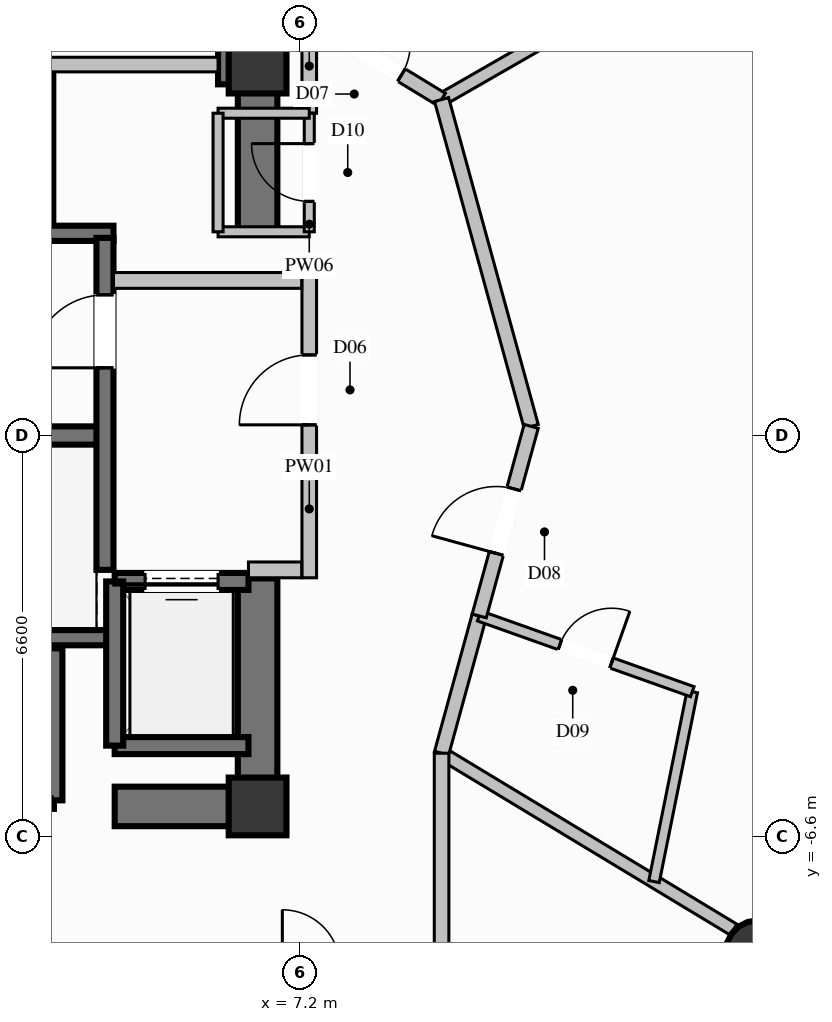
"""IFC4 building model, lengths in metres.
Left out: names, types, materials, properties, quantities, classifications, styles, units other than length and angle.
Written with IfcOpenShell. Run it as: python <this file> out.ifc"""

import sys

from ifc_helpers import new_model, si_unit, direction, frame, frame_2d, origin, origin_2d, place, context, subcontext, project, spatial, rectangle, circle, extrude, element, fill, save


model = new_model("IFC4")
c1 = context("Model", 3, precision=1e-05, world=origin(), true_north=direction((0.0, 1.0)))
c2 = subcontext(c1, "Body", "Model", "MODEL_VIEW")
j1 = project(units=[si_unit("LENGTHUNIT", "METRE"), si_unit("PLANEANGLEUNIT", "RADIAN")], contexts=[c1])
p1 = place(None, origin())
s1 = spatial("IfcSite", under=j1, at=p1, CompositionType="ELEMENT")
p2 = place(p1, origin())
s2 = spatial("IfcBuilding", under=s1, at=p2, CompositionType="ELEMENT")
p3 = place(p2, frame((0.0, 0.0, 117.0)))
s3 = spatial("IfcBuildingStorey", under=s2, at=p3, CompositionType="ELEMENT", Elevation=117.0)
for number, where, z_axis, x_axis in (
    (1, (6.5, -6.1, 0.0), (0.0, 0.0, 1.0), (1.0, 0.0, 0.0)),
    (2, (6.5, 6.1, 0.0), (0.0, 0.0, 1.0), (1.0, 0.0, 0.0)),
):
    element("IfcColumn", number, at=place(p3, frame(where, z_axis=z_axis, x_axis=x_axis)), inside=s3, PredefinedType="COLUMN", context=c2, shape_type="SweptSolid", body=[
        extrude(rectangle(XDim=0.95, YDim=0.95, at=origin_2d()), origin(), (0.0, 0.0, 1.0), 3.6),
    ])
p4 = place(p3, frame((-3.99, 0.0, 0.0), z_axis=(0.0, 0.0, 1.0), x_axis=(1.0, 0.0, 0.0)))
e3 = element("IfcWall", 3, at=p4, inside=s3, PredefinedType="SHEAR", context=c2, shape_type="SweptSolid", body=[
    extrude(rectangle(XDim=7.98, YDim=0.3, at=frame_2d((3.99, 0.0))), origin(), (0.0, 0.0, 1.0), 3.6),
])
for number, where, z_axis, x_axis in (
    (4, (-4.13, -3.325, 0.0), (0.0, 0.0, 1.0), (1.0, 0.0, 0.0)),
    (5, (-4.13, 3.325, 0.0), (0.0, 0.0, 1.0), (1.0, 0.0, 0.0)),
):
    element("IfcWall", number, at=place(p3, frame(where, z_axis=z_axis, x_axis=x_axis)), inside=s3, PredefinedType="SOLIDWALL", context=c2, shape_type="SweptSolid", body=[
        extrude(rectangle(XDim=8.26, YDim=0.25, at=frame_2d((4.13, 0.0))), origin(), (0.0, 0.0, 1.0), 3.6),
    ])
p5 = place(p3, frame((4.15, -6.1, 0.0), z_axis=(0.0, 0.0, 1.0), x_axis=(1.0, 0.0, 0.0)))
e6 = element("IfcWall", 6, at=p5, inside=s3, PredefinedType="SHEAR", context=c2, shape_type="SweptSolid", body=[
    extrude(rectangle(XDim=2.025, YDim=0.65, at=frame_2d((1.013, 0.0))), origin(), (0.0, 0.0, 1.0), 3.6),
])
p6 = place(p3, frame((5.85, 6.1, 0.0), z_axis=(0.0, 0.0, 1.0), x_axis=(1.0, 0.0, 0.0)))
e7 = element("IfcWall", 7, at=p6, inside=s3, PredefinedType="SHEAR", context=c2, shape_type="SweptSolid", body=[
    extrude(rectangle(XDim=0.325, YDim=0.65, at=frame_2d((0.163, 0.0))), origin(), (0.0, 0.0, 1.0), 3.6),
])
p7 = place(p3, frame((6.5, -6.425, 0.0), z_axis=(0.0, 0.0, 1.0), x_axis=(0.0, 1.0, 0.0)))
e8 = element("IfcWall", 8, at=p7, inside=s3, PredefinedType="SHEAR", context=c2, shape_type="SweptSolid", body=[
    extrude(rectangle(XDim=4.075, YDim=0.65, at=frame_2d((2.038, 0.0))), origin(), (0.0, 0.0, 1.0), 3.6),
])
p8 = place(p3, frame((6.5, 3.35, 0.0), z_axis=(0.0, 0.0, 1.0), x_axis=(0.0, 1.0, 0.0)))
e9 = element("IfcWall", 9, at=p8, inside=s3, PredefinedType="SHEAR", context=c2, shape_type="SweptSolid", body=[
    extrude(rectangle(XDim=3.075, YDim=0.65, at=frame_2d((1.538, 0.0))), origin(), (0.0, 0.0, 1.0), 3.6),
])
p9 = place(p3, frame((14.722, -8.5, 0.0), z_axis=(0.0, 0.0, 1.0), x_axis=(1.0, 0.0, 0.0)))
e10 = element("IfcColumn", 10, at=p9, inside=s3, PredefinedType="COLUMN", context=c2, shape_type="SweptSolid", body=[
    extrude(circle(Radius=0.525, at=origin_2d()), origin(), (0.0, 0.0, 1.0), 3.6),
])
p10 = place(p3, frame((1.05, -6.0, 0.0), z_axis=(0.0, 0.0, 1.0), x_axis=(1.0, 0.0, 0.0)))
e11 = element("IfcWall", 11, at=p10, inside=s3, PredefinedType="SOLIDWALL", context=c2, shape_type="SweptSolid", body=[
    extrude(rectangle(XDim=2.1, YDim=0.28, at=frame_2d((1.05, 0.0))), origin(), (0.0, 0.0, 1.0), 3.35),
])
p11 = place(p10, frame((0.5, 0.0, 0.0)))
e12 = element("IfcOpeningElement", 12, at=p11, cuts=e11, PredefinedType="OPENING", context=c2, shape_type="SweptSolid", body=[
    extrude(rectangle(XDim=1.1, YDim=2.2, at=frame_2d((0.55, 1.1))), frame((0.0, 0.15, 0.0), z_axis=(0.0, -1.0, 0.0), x_axis=(1.0, 0.0, 0.0)), (0.0, 0.0, 1.0), 0.3),
])
for number, where, z_axis, x_axis in (
    (13, (3.15, -6.0, 0.0), (0.0, 0.0, 1.0), (0.0, 1.0, 0.0)),
    (14, (3.0, 3.5, 0.0), (0.0, 0.0, 1.0), (0.0, 1.0, 0.0)),
):
    element("IfcWall", number, at=place(p3, frame(where, z_axis=z_axis, x_axis=x_axis)), inside=s3, PredefinedType="SOLIDWALL", context=c2, shape_type="SweptSolid", body=[
        extrude(rectangle(XDim=2.5, YDim=0.28, at=frame_2d((1.25, 0.0))), origin(), (0.0, 0.0, 1.0), 3.35),
    ])
p12 = place(p3, frame((4.15, -5.1, 0.0), z_axis=(0.0, 0.0, 1.0), x_axis=(1.0, 0.0, 0.0)))
e15 = element("IfcWall", 15, at=p12, inside=s3, PredefinedType="SOLIDWALL", context=c2, shape_type="SweptSolid", body=[
    extrude(rectangle(XDim=2.2, YDim=0.28, at=frame_2d((1.1, 0.0))), origin(), (0.0, 0.0, 1.0), 3.35),
])
p13 = place(p3, frame((6.35, -2.4, 0.0), z_axis=(0.0, 0.0, 1.0), x_axis=(-1.0, 0.0, 0.0)))
e16 = element("IfcWall", 16, at=p13, inside=s3, PredefinedType="SOLIDWALL", context=c2, shape_type="SweptSolid", body=[
    extrude(rectangle(XDim=2.2, YDim=0.28, at=frame_2d((1.1, 0.0))), origin(), (0.0, 0.0, 1.0), 3.35),
])
p14 = place(p13, frame((0.5, 0.0, 0.0)))
e17 = element("IfcOpeningElement", 17, at=p14, cuts=e16, PredefinedType="OPENING", context=c2, shape_type="SweptSolid", body=[
    extrude(rectangle(XDim=1.2, YDim=2.2, at=frame_2d((0.6, 1.1))), frame((0.0, 0.15, 0.0), z_axis=(0.0, -1.0, 0.0), x_axis=(1.0, 0.0, 0.0)), (0.0, 0.0, 1.0), 0.3),
])
p15 = place(p3, frame((4.15, -2.4, 0.0), z_axis=(0.0, 0.0, 1.0), x_axis=(0.0, -1.0, 0.0)))
e18 = element("IfcWall", 18, at=p15, inside=s3, PredefinedType="SOLIDWALL", context=c2, shape_type="SweptSolid", body=[
    extrude(rectangle(XDim=2.7, YDim=0.28, at=frame_2d((1.35, 0.0))), origin(), (0.0, 0.0, 1.0), 3.35),
])
p16 = place(p3, frame((3.99, -2.21, 0.0), z_axis=(0.0, 0.0, 1.0), x_axis=(0.0, 1.0, 0.0)))
e19 = element("IfcWall", 19, at=p16, inside=s3, PredefinedType="SOLIDWALL", context=c2, shape_type="SweptSolid", body=[
    extrude(rectangle(XDim=5.46, YDim=0.28, at=frame_2d((2.73, 0.0))), origin(), (0.0, 0.0, 1.0), 3.35),
])
p17 = place(p16, frame((3.323, 0.0, 0.0)))
e20 = element("IfcOpeningElement", 20, at=p17, cuts=e19, PredefinedType="OPENING", context=c2, shape_type="SweptSolid", body=[
    extrude(rectangle(XDim=1.2, YDim=2.2, at=frame_2d((0.6, 1.1))), frame((0.0, 0.15, 0.0), z_axis=(0.0, -1.0, 0.0), x_axis=(1.0, 0.0, 0.0)), (0.0, 0.0, 1.0), 0.3),
])
p18 = place(p3, frame((7.35, -2.34, 0.0), z_axis=(0.0, 0.0, 1.0), x_axis=(0.0, 1.0, 0.0)))
e21 = element("IfcWall", 21, at=p18, inside=s3, PredefinedType="PARTITIONING", context=c2, shape_type="SweptSolid", body=[
    extrude(rectangle(XDim=5.02, YDim=0.24, at=frame_2d((2.51, 0.0))), origin(), (0.0, 0.0, 1.0), 2.435),
])
p19 = place(p18, frame((2.515, 0.0, 0.0)))
e22 = element("IfcOpeningElement", 22, at=p19, cuts=e21, PredefinedType="OPENING", context=c2, shape_type="SweptSolid", body=[
    extrude(rectangle(XDim=1.15, YDim=2.2, at=frame_2d((0.575, 1.1))), frame((0.0, 0.13, 0.0), z_axis=(0.0, -1.0, 0.0), x_axis=(1.0, 0.0, 0.0)), (0.0, 0.0, 1.0), 0.26),
])
p20 = place(p3, frame((6.35, -2.21, 0.0), z_axis=(0.0, 0.0, 1.0), x_axis=(1.0, 0.0, 0.0)))
e23 = element("IfcWall", 23, at=p20, inside=s3, PredefinedType="PARTITIONING", context=c2, shape_type="SweptSolid", body=[
    extrude(rectangle(XDim=0.875, YDim=0.26, at=frame_2d((0.438, 0.0))), origin(), (0.0, 0.0, 1.0), 3.35),
])
p21 = place(p3, frame((4.13, 2.55, 0.0), z_axis=(0.0, 0.0, 1.0), x_axis=(1.0, 0.0, 0.0)))
e24 = element("IfcWall", 24, at=p21, inside=s3, PredefinedType="PARTITIONING", context=c2, shape_type="SweptSolid", body=[
    extrude(rectangle(XDim=3.095, YDim=0.26, at=frame_2d((1.548, 0.0))), origin(), (0.0, 0.0, 1.0), 3.35),
])
p22 = place(p3, frame((7.35, 5.3, 0.0), z_axis=(0.0, 0.0, 1.0), x_axis=(0.0, 1.0, 0.0)))
e25 = element("IfcWall", 25, at=p22, inside=s3, PredefinedType="PARTITIONING", context=c2, shape_type="SweptSolid", body=[
    extrude(rectangle(XDim=1.55, YDim=0.24, at=frame_2d((0.775, 0.0))), origin(), (0.0, 0.0, 1.0), 2.435),
])
p23 = place(p3, frame((3.0, 6.1, 0.0), z_axis=(0.0, 0.0, 1.0), x_axis=(1.0, 0.0, 0.0)))
e26 = element("IfcWall", 26, at=p23, inside=s3, PredefinedType="PARTITIONING", context=c2, shape_type="SweptSolid", body=[
    extrude(rectangle(XDim=2.85, YDim=0.24, at=frame_2d((1.425, 0.0))), origin(), (0.0, 0.0, 1.0), 2.435),
])
p24 = place(p3, frame((5.85, 3.35, 0.0), z_axis=(0.0, 0.0, 1.0), x_axis=(1.0, 0.0, 0.0)))
e27 = element("IfcWall", 27, at=p24, inside=s3, PredefinedType="PARTITIONING", context=c2, shape_type="SweptSolid", body=[
    extrude(rectangle(XDim=1.5, YDim=0.165, at=frame_2d((0.75, 0.0))), origin(), (0.0, 0.0, 1.0), 3.35),
])
p25 = place(p3, frame((7.35, 3.35, 0.0), z_axis=(0.0, 0.0, 1.0), x_axis=(0.0, 1.0, 0.0)))
e28 = element("IfcWall", 28, at=p25, inside=s3, PredefinedType="PARTITIONING", context=c2, shape_type="SweptSolid", body=[
    extrude(rectangle(XDim=1.95, YDim=0.165, at=frame_2d((0.975, 0.0))), origin(), (0.0, 0.0, 1.0), 3.35),
])
p26 = place(p25, frame((0.5, 0.0, 0.0)))
e29 = element("IfcOpeningElement", 29, at=p26, cuts=e28, PredefinedType="OPENING", context=c2, shape_type="SweptSolid", body=[
    extrude(rectangle(XDim=0.95, YDim=2.1, at=frame_2d((0.475, 1.05))), frame((0.0, 0.093, 0.0), z_axis=(0.0, -1.0, 0.0), x_axis=(1.0, 0.0, 0.0)), (0.0, 0.0, 1.0), 0.185),
])
p27 = place(p3, frame((7.35, 5.3, 0.0), z_axis=(0.0, 0.0, 1.0), x_axis=(-1.0, 0.0, 0.0)))
e30 = element("IfcWall", 30, at=p27, inside=s3, PredefinedType="PARTITIONING", context=c2, shape_type="SweptSolid", body=[
    extrude(rectangle(XDim=1.5, YDim=0.165, at=frame_2d((0.75, 0.0))), origin(), (0.0, 0.0, 1.0), 2.435),
])
p28 = place(p3, frame((5.85, 5.3, 0.0), z_axis=(0.0, 0.0, 1.0), x_axis=(0.0, -1.0, 0.0)))
e31 = element("IfcWall", 31, at=p28, inside=s3, PredefinedType="PARTITIONING", context=c2, shape_type="SweptSolid", body=[
    extrude(rectangle(XDim=1.95, YDim=0.165, at=frame_2d((0.975, 0.0))), origin(), (0.0, 0.0, 1.0), 2.435),
])
p29 = place(p3, frame((9.526, 5.525, 0.0), z_axis=(0.0, 0.0, 1.0), x_axis=(0.867217229482, 0.497929991956, 0.0)))
e32 = element("IfcWall", 32, at=p29, inside=s3, PredefinedType="PARTITIONING", context=c2, shape_type="SweptSolid", body=[
    extrude(rectangle(XDim=5.443, YDim=0.21, at=frame_2d((2.721, 0.0))), origin(), (0.0, 0.0, 1.0), 2.791),
])
p30 = place(p3, frame((9.526, -5.225, 0.0), z_axis=(0.0, 0.0, 1.0), x_axis=(0.855972129744, -0.517021965782, 0.0)))
e33 = element("IfcWall", 33, at=p30, inside=s3, PredefinedType="PARTITIONING", context=c2, shape_type="SweptSolid", body=[
    extrude(rectangle(XDim=5.609, YDim=0.21, at=frame_2d((2.804, 0.0))), origin(), (0.0, 0.0, 1.0), 2.791),
])
p31 = place(p3, frame((7.35, 6.85, 0.0), z_axis=(0.0, 0.0, 1.0), x_axis=(0.854057882133, -0.520177982969, 0.0)))
e34 = element("IfcWall", 34, at=p31, inside=s3, PredefinedType="PARTITIONING", context=c2, shape_type="SweptSolid", body=[
    extrude(rectangle(XDim=2.548, YDim=0.24, at=frame_2d((1.274, 0.0))), origin(), (0.0, 0.0, 1.0), 3.35),
])
p32 = place(p31, frame((0.774, 0.0, 0.0)))
e35 = element("IfcOpeningElement", 35, at=p32, cuts=e34, PredefinedType="OPENING", context=c2, shape_type="SweptSolid", body=[
    extrude(rectangle(XDim=1.0, YDim=2.2, at=frame_2d((0.5, 1.1))), frame((0.0, 0.13, 0.0), z_axis=(0.0, -1.0, 0.0), x_axis=(1.0, 0.0, 0.0)), (0.0, 0.0, 1.0), 0.26),
])
p33 = place(p3, frame((9.526, -5.225, 0.0), z_axis=(0.0, 0.0, 1.0), x_axis=(0.264431780812, 0.964404393031, 0.0)))
e36 = element("IfcWall", 36, at=p33, inside=s3, PredefinedType="PARTITIONING", context=c2, shape_type="SweptSolid", body=[
    extrude(rectangle(XDim=2.341, YDim=0.24, at=frame_2d((1.171, 0.0))), origin(), (0.0, 0.0, 1.0), 3.35),
])
p34 = place(p3, frame((13.02, -7.336, 0.0), z_axis=(0.0, 0.0, 1.0), x_axis=(0.197412870908, 0.980320436592, 0.0)))
e37 = element("IfcWall", 37, at=p34, inside=s3, PredefinedType="PLUMBINGWALL", context=c2, shape_type="SweptSolid", body=[
    extrude(rectangle(XDim=3.186, YDim=0.175, at=frame_2d((1.593, 0.0))), origin(), (0.0, 0.0, 1.0), 3.35),
])
p35 = place(p3, frame((10.145, -2.967, 0.0), z_axis=(0.0, 0.0, 1.0), x_axis=(0.942213308765, -0.335013553137, 0.0)))
e38 = element("IfcWall", 38, at=p35, inside=s3, PredefinedType="PLUMBINGWALL", context=c2, shape_type="SweptSolid", body=[
    extrude(rectangle(XDim=3.719, YDim=0.175, at=frame_2d((1.859, 0.0))), origin(), (0.0, 0.0, 1.0), 3.35),
])
p36 = place(p35, frame((1.409, 0.0, 0.0)))
e39 = element("IfcOpeningElement", 39, at=p36, cuts=e38, PredefinedType="OPENING", context=c2, shape_type="SweptSolid", body=[
    extrude(rectangle(XDim=0.9, YDim=2.1, at=frame_2d((0.45, 1.05))), frame((0.0, 0.098, 0.0), z_axis=(0.0, -1.0, 0.0), x_axis=(1.0, 0.0, 0.0)), (0.0, 0.0, 1.0), 0.195),
])
p37 = place(p3, frame((11.0, 0.15, 0.0), z_axis=(0.0, 0.0, 1.0), x_axis=(-0.264488542062, 0.964388827765, 0.0)))
e40 = element("IfcWall", 40, at=p37, inside=s3, PredefinedType="PARTITIONING", context=c2, shape_type="SweptSolid", body=[
    extrude(rectangle(XDim=5.573, YDim=0.24, at=frame_2d((2.787, 0.0))), origin(), (0.0, 0.0, 1.0), 2.985),
])
p38 = place(p3, frame((10.145, -2.967, 0.0), z_axis=(0.0, 0.0, 1.0), x_axis=(0.264529660797, 0.9643775498, 0.0)))
e41 = element("IfcWall", 41, at=p38, inside=s3, PredefinedType="PARTITIONING", context=c2, shape_type="SweptSolid", body=[
    extrude(rectangle(XDim=3.232, YDim=0.24, at=frame_2d((1.616, 0.0))), origin(), (0.0, 0.0, 1.0), 2.985),
])
p39 = place(p38, frame((1.066, 0.0, 0.0)))
e42 = element("IfcOpeningElement", 42, at=p39, cuts=e41, PredefinedType="OPENING", context=c2, shape_type="SweptSolid", body=[
    extrude(rectangle(XDim=1.1, YDim=2.3, at=frame_2d((0.55, 1.15))), frame((0.0, 0.13, 0.0), z_axis=(0.0, -1.0, 0.0), x_axis=(1.0, 0.0, 0.0)), (0.0, 0.0, 1.0), 0.26),
])
p40 = place(p3, frame((9.526, -8.75, 0.0), z_axis=(0.0, 0.0, 1.0), x_axis=(0.0, 1.0, 0.0)))
e43 = element("IfcWall", 43, at=p40, inside=s3, PredefinedType="PARTITIONING", context=c2, shape_type="SweptSolid", body=[
    extrude(rectangle(XDim=3.525, YDim=0.24, at=frame_2d((1.762, 0.0))), origin(), (0.0, 0.0, 1.0), 3.35),
])
p41 = place(p14, origin())
e44 = element("IfcDoor", 44, at=p41, inside=s3, OperationType="SLIDING_TO_LEFT", PredefinedType="DOOR", context=c2, shape_type="SweptSolid", body=[
    extrude(rectangle(XDim=1.2, YDim=2.2, at=frame_2d((0.6, 1.1))), frame((0.0, 0.025, 0.0), z_axis=(0.0, -1.0, 0.0), x_axis=(1.0, 0.0, 0.0)), (0.0, 0.0, 1.0), 0.05),
])
fill(e17, e44)
p42 = place(p17, origin())
e45 = element("IfcDoor", 45, at=p42, inside=s3, OperationType="SINGLE_SWING_LEFT", PredefinedType="DOOR", context=c2, shape_type="SweptSolid", body=[
    extrude(rectangle(XDim=1.2, YDim=2.2, at=frame_2d((0.6, 1.1))), frame((0.0, 0.025, 0.0), z_axis=(0.0, -1.0, 0.0), x_axis=(1.0, 0.0, 0.0)), (0.0, 0.0, 1.0), 0.05),
])
fill(e20, e45)
p43 = place(p19, origin())
e46 = element("IfcDoor", 46, at=p43, inside=s3, OperationType="SINGLE_SWING_LEFT", PredefinedType="DOOR", context=c2, shape_type="SweptSolid", body=[
    extrude(rectangle(XDim=1.15, YDim=2.2, at=frame_2d((0.575, 1.1))), frame((0.0, 0.025, 0.0), z_axis=(0.0, -1.0, 0.0), x_axis=(1.0, 0.0, 0.0)), (0.0, 0.0, 1.0), 0.05),
])
fill(e22, e46)
p44 = place(p26, origin())
e47 = element("IfcDoor", 47, at=p44, inside=s3, OperationType="SINGLE_SWING_RIGHT", PredefinedType="DOOR", context=c2, shape_type="SweptSolid", body=[
    extrude(rectangle(XDim=0.95, YDim=2.1, at=frame_2d((0.475, 1.05))), frame((0.0, 0.025, 0.0), z_axis=(0.0, -1.0, 0.0), x_axis=(1.0, 0.0, 0.0)), (0.0, 0.0, 1.0), 0.05),
])
fill(e29, e47)
p45 = place(p32, origin())
e48 = element("IfcDoor", 48, at=p45, inside=s3, OperationType="SINGLE_SWING_LEFT", PredefinedType="DOOR", context=c2, shape_type="SweptSolid", body=[
    extrude(rectangle(XDim=1.0, YDim=2.2, at=frame_2d((0.5, 1.1))), frame((0.0, 0.025, 0.0), z_axis=(0.0, -1.0, 0.0), x_axis=(1.0, 0.0, 0.0)), (0.0, 0.0, 1.0), 0.05),
])
fill(e35, e48)
p46 = place(p36, origin())
e49 = element("IfcDoor", 49, at=p46, inside=s3, OperationType="SINGLE_SWING_RIGHT", PredefinedType="DOOR", context=c2, shape_type="SweptSolid", body=[
    extrude(rectangle(XDim=0.9, YDim=2.1, at=frame_2d((0.45, 1.05))), frame((0.0, 0.025, 0.0), z_axis=(0.0, -1.0, 0.0), x_axis=(1.0, 0.0, 0.0)), (0.0, 0.0, 1.0), 0.05),
])
fill(e39, e49)
p47 = place(p39, origin())
e50 = element("IfcDoor", 50, at=p47, inside=s3, OperationType="SINGLE_SWING_LEFT", PredefinedType="DOOR", context=c2, shape_type="SweptSolid", body=[
    extrude(rectangle(XDim=1.1, YDim=2.3, at=frame_2d((0.55, 1.15))), frame((0.0, 0.025, 0.0), z_axis=(0.0, -1.0, 0.0), x_axis=(1.0, 0.0, 0.0)), (0.0, 0.0, 1.0), 0.05),
])
fill(e42, e50)
save(model, sys.argv[1])
